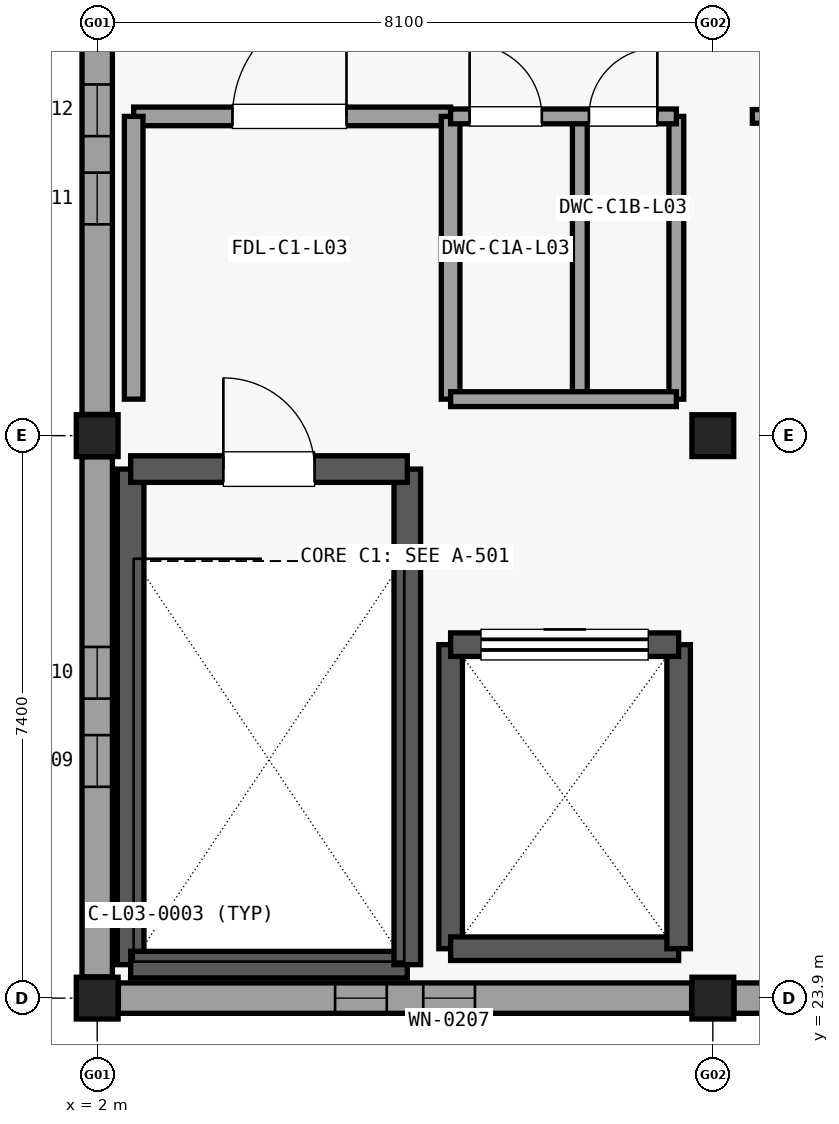
"""IFC4 building model, lengths in metres.
Left out: names, types, materials, properties, quantities, classifications, styles, units other than length and angle.
Written with IfcOpenShell. Run it as: python <this file> out.ifc"""

import sys

from ifc_helpers import new_model, si_unit, direction, frame, frame_2d, origin, origin_2d, place, context, subcontext, project, spatial, rectangle, extrude, element, fill, save


model = new_model("IFC4")
c1 = context("Model", 3, precision=1e-05, world=origin(), true_north=direction((0.0, 1.0)))
c2 = subcontext(c1, "Body", "Model", "MODEL_VIEW")
j1 = project(units=[si_unit("LENGTHUNIT", "METRE"), si_unit("PLANEANGLEUNIT", "RADIAN")], contexts=[c1])
p1 = place(None, origin())
s1 = spatial("IfcSite", under=j1, at=p1, CompositionType="ELEMENT")
p2 = place(p1, origin())
s2 = spatial("IfcBuilding", under=s1, at=p2, CompositionType="ELEMENT")
p3 = place(p2, frame((0.0, 0.0, 13.8)))
s3 = spatial("IfcBuildingStorey", under=s2, at=p3, CompositionType="ELEMENT", Elevation=13.8)
for number, where, z_axis, x_axis in (
    (1, (2.0, 23.9, 0.0), (0.0, 0.0, 1.0), (1.0, 0.0, 0.0)),
    (2, (2.0, 31.3, 0.0), (0.0, 0.0, 1.0), (1.0, 0.0, 0.0)),
    (3, (10.1, 23.9, 0.0), (0.0, 0.0, 1.0), (1.0, 0.0, 0.0)),
    (4, (10.1, 31.3, 0.0), (0.0, 0.0, 1.0), (1.0, 0.0, 0.0)),
):
    element("IfcColumn", number, at=place(p3, frame(where, z_axis=z_axis, x_axis=x_axis)), inside=s3, PredefinedType="COLUMN", context=c2, shape_type="SweptSolid", body=[
        extrude(rectangle(XDim=0.55, YDim=0.55, at=origin_2d()), origin(), (0.0, 0.0, 1.0), 3.38),
    ])
p4 = place(p3, frame((9.821, 23.9, 0.0), z_axis=(0.0, 0.0, 1.0), x_axis=(-1.0, 0.0, 0.0)))
e5 = element("IfcWall", 5, at=p4, inside=s3, PredefinedType="SOLIDWALL", context=c2, shape_type="SweptSolid", body=[
    extrude(rectangle(XDim=7.542, YDim=0.4, at=frame_2d((3.771, 0.0))), origin(), (0.0, 0.0, 1.0), 2.908),
])
p5 = place(p4, frame((2.851, 0.0, 0.6)))
e6 = element("IfcOpeningElement", 6, at=p5, cuts=e5, PredefinedType="OPENING", context=c2, shape_type="SweptSolid", body=[
    extrude(rectangle(XDim=0.68, YDim=1.78, at=frame_2d((0.34, 0.89))), frame((0.0, 0.21, 0.0), z_axis=(0.0, -1.0, 0.0), x_axis=(1.0, 0.0, 0.0)), (0.0, 0.0, 1.0), 0.42),
])
p6 = place(p4, frame((4.011, 0.0, 0.6)))
e7 = element("IfcOpeningElement", 7, at=p6, cuts=e5, PredefinedType="OPENING", context=c2, shape_type="SweptSolid", body=[
    extrude(rectangle(XDim=0.68, YDim=1.78, at=frame_2d((0.34, 0.89))), frame((0.0, 0.21, 0.0), z_axis=(0.0, -1.0, 0.0), x_axis=(1.0, 0.0, 0.0)), (0.0, 0.0, 1.0), 0.42),
])
p7 = place(p3, frame((2.0, 24.179, 0.0), z_axis=(0.0, 0.0, 1.0), x_axis=(0.0, 1.0, 0.0)))
e8 = element("IfcWall", 8, at=p7, inside=s3, PredefinedType="SOLIDWALL", context=c2, shape_type="SweptSolid", body=[
    extrude(rectangle(XDim=6.842, YDim=0.4, at=frame_2d((3.421, 0.0))), origin(), (0.0, 0.0, 1.0), 2.908),
])
p8 = place(p7, frame((2.501, 0.0, 0.6)))
e9 = element("IfcOpeningElement", 9, at=p8, cuts=e8, PredefinedType="OPENING", context=c2, shape_type="SweptSolid", body=[
    extrude(rectangle(XDim=0.68, YDim=1.78, at=frame_2d((0.34, 0.89))), frame((0.0, 0.21, 0.0), z_axis=(0.0, -1.0, 0.0), x_axis=(1.0, 0.0, 0.0)), (0.0, 0.0, 1.0), 0.42),
])
p9 = place(p7, frame((3.661, 0.0, 0.6)))
e10 = element("IfcOpeningElement", 10, at=p9, cuts=e8, PredefinedType="OPENING", context=c2, shape_type="SweptSolid", body=[
    extrude(rectangle(XDim=0.68, YDim=1.78, at=frame_2d((0.34, 0.89))), frame((0.0, 0.21, 0.0), z_axis=(0.0, -1.0, 0.0), x_axis=(1.0, 0.0, 0.0)), (0.0, 0.0, 1.0), 0.42),
])
p10 = place(p3, frame((2.0, 31.579, 0.0), z_axis=(0.0, 0.0, 1.0), x_axis=(0.0, 1.0, 0.0)))
e11 = element("IfcWall", 11, at=p10, inside=s3, PredefinedType="SOLIDWALL", context=c2, shape_type="SweptSolid", body=[
    extrude(rectangle(XDim=6.842, YDim=0.4, at=frame_2d((3.421, 0.0))), origin(), (0.0, 0.0, 1.0), 2.908),
])
p11 = place(p10, frame((2.501, 0.0, 0.6)))
e12 = element("IfcOpeningElement", 12, at=p11, cuts=e11, PredefinedType="OPENING", context=c2, shape_type="SweptSolid", body=[
    extrude(rectangle(XDim=0.68, YDim=1.78, at=frame_2d((0.34, 0.89))), frame((0.0, 0.21, 0.0), z_axis=(0.0, -1.0, 0.0), x_axis=(1.0, 0.0, 0.0)), (0.0, 0.0, 1.0), 0.42),
])
p12 = place(p10, frame((3.661, 0.0, 0.6)))
e13 = element("IfcOpeningElement", 13, at=p12, cuts=e11, PredefinedType="OPENING", context=c2, shape_type="SweptSolid", body=[
    extrude(rectangle(XDim=0.68, YDim=1.78, at=frame_2d((0.34, 0.89))), frame((0.0, 0.21, 0.0), z_axis=(0.0, -1.0, 0.0), x_axis=(1.0, 0.0, 0.0)), (0.0, 0.0, 1.0), 0.42),
])
p13 = place(p3, frame((17.921, 23.9, 0.0), z_axis=(0.0, 0.0, 1.0), x_axis=(-1.0, 0.0, 0.0)))
e14 = element("IfcWall", 14, at=p13, inside=s3, PredefinedType="SOLIDWALL", context=c2, shape_type="SweptSolid", body=[
    extrude(rectangle(XDim=7.542, YDim=0.4, at=frame_2d((3.771, 0.0))), origin(), (0.0, 0.0, 1.0), 2.908),
])
p14 = place(p13, frame((2.851, 0.0, 0.6)))
e15 = element("IfcOpeningElement", 15, at=p14, cuts=e14, PredefinedType="OPENING", context=c2, shape_type="SweptSolid", body=[
    extrude(rectangle(XDim=0.68, YDim=1.78, at=frame_2d((0.34, 0.89))), frame((0.0, 0.21, 0.0), z_axis=(0.0, -1.0, 0.0), x_axis=(1.0, 0.0, 0.0)), (0.0, 0.0, 1.0), 0.42),
])
p15 = place(p13, frame((4.011, 0.0, 0.6)))
e16 = element("IfcOpeningElement", 16, at=p15, cuts=e14, PredefinedType="OPENING", context=c2, shape_type="SweptSolid", body=[
    extrude(rectangle(XDim=0.68, YDim=1.78, at=frame_2d((0.34, 0.89))), frame((0.0, 0.21, 0.0), z_axis=(0.0, -1.0, 0.0), x_axis=(1.0, 0.0, 0.0)), (0.0, 0.0, 1.0), 0.42),
])
p16 = place(p3, frame((2.44, 24.34, 0.0), z_axis=(0.0, 0.0, 1.0), x_axis=(0.0, 1.0, 0.0)))
e17 = element("IfcWall", 17, at=p16, inside=s3, PredefinedType="SHEAR", context=c2, shape_type="SweptSolid", body=[
    extrude(rectangle(XDim=6.52, YDim=0.35, at=frame_2d((3.26, 0.0))), origin(), (0.0, 0.0, 1.0), 3.375),
])
p17 = place(p3, frame((2.44, 24.34, 0.0), z_axis=(0.0, 0.0, 1.0), x_axis=(1.0, 0.0, 0.0)))
e18 = element("IfcWall", 18, at=p17, inside=s3, PredefinedType="SHEAR", context=c2, shape_type="SweptSolid", body=[
    extrude(rectangle(XDim=3.64, YDim=0.35, at=frame_2d((1.82, 0.0))), origin(), (0.0, 0.0, 1.0), 3.375),
])
p18 = place(p3, frame((6.08, 24.34, 0.0), z_axis=(0.0, 0.0, 1.0), x_axis=(0.0, 1.0, 0.0)))
e19 = element("IfcWall", 19, at=p18, inside=s3, PredefinedType="SHEAR", context=c2, shape_type="SweptSolid", body=[
    extrude(rectangle(XDim=6.52, YDim=0.35, at=frame_2d((3.26, 0.0))), origin(), (0.0, 0.0, 1.0), 3.375),
])
p19 = place(p3, frame((2.44, 30.86, 0.0), z_axis=(0.0, 0.0, 1.0), x_axis=(1.0, 0.0, 0.0)))
e20 = element("IfcWall", 20, at=p19, inside=s3, PredefinedType="SHEAR", context=c2, shape_type="SweptSolid", body=[
    extrude(rectangle(XDim=3.64, YDim=0.35, at=frame_2d((1.82, 0.0))), origin(), (0.0, 0.0, 1.0), 3.375),
])
p20 = place(p19, frame((1.22, 0.0, 0.0)))
e21 = element("IfcOpeningElement", 21, at=p20, cuts=e20, PredefinedType="OPENING", context=c2, shape_type="SweptSolid", body=[
    extrude(rectangle(XDim=1.2, YDim=2.15, at=frame_2d((0.6, 1.075))), frame((0.0, 0.185, 0.0), z_axis=(0.0, -1.0, 0.0), x_axis=(1.0, 0.0, 0.0)), (0.0, 0.0, 1.0), 0.37),
])
p21 = place(p3, frame((6.65, 24.55, 0.0), z_axis=(0.0, 0.0, 1.0), x_axis=(0.0, 1.0, 0.0)))
e22 = element("IfcWall", 22, at=p21, inside=s3, PredefinedType="SHEAR", context=c2, shape_type="SweptSolid", body=[
    extrude(rectangle(XDim=4.0, YDim=0.31, at=frame_2d((2.0, 0.0))), origin(), (0.0, 0.0, 1.0), 3.375),
])
p22 = place(p3, frame((6.65, 24.55, 0.0), z_axis=(0.0, 0.0, 1.0), x_axis=(1.0, 0.0, 0.0)))
e23 = element("IfcWall", 23, at=p22, inside=s3, PredefinedType="SHEAR", context=c2, shape_type="SweptSolid", body=[
    extrude(rectangle(XDim=3.0, YDim=0.31, at=frame_2d((1.5, 0.0))), origin(), (0.0, 0.0, 1.0), 3.375),
])
p23 = place(p3, frame((9.65, 24.55, 0.0), z_axis=(0.0, 0.0, 1.0), x_axis=(0.0, 1.0, 0.0)))
e24 = element("IfcWall", 24, at=p23, inside=s3, PredefinedType="SHEAR", context=c2, shape_type="SweptSolid", body=[
    extrude(rectangle(XDim=4.0, YDim=0.31, at=frame_2d((2.0, 0.0))), origin(), (0.0, 0.0, 1.0), 3.375),
])
p24 = place(p3, frame((6.65, 28.55, 0.0), z_axis=(0.0, 0.0, 1.0), x_axis=(1.0, 0.0, 0.0)))
e25 = element("IfcWall", 25, at=p24, inside=s3, PredefinedType="SHEAR", context=c2, shape_type="SweptSolid", body=[
    extrude(rectangle(XDim=3.0, YDim=0.31, at=frame_2d((1.5, 0.0))), origin(), (0.0, 0.0, 1.0), 3.375),
])
p25 = place(p24, frame((0.4, 0.0, 0.0)))
e26 = element("IfcOpeningElement", 26, at=p25, cuts=e25, PredefinedType="OPENING", context=c2, shape_type="SweptSolid", body=[
    extrude(rectangle(XDim=2.2, YDim=2.55, at=frame_2d((1.1, 1.275))), frame((0.0, 0.165, 0.0), z_axis=(0.0, -1.0, 0.0), x_axis=(1.0, 0.0, 0.0)), (0.0, 0.0, 1.0), 0.33),
])
p26 = place(p3, frame((2.48, 35.5, 0.0), z_axis=(0.0, 0.0, 1.0), x_axis=(1.0, 0.0, 0.0)))
e27 = element("IfcWall", 27, at=p26, inside=s3, PredefinedType="PARTITIONING", context=c2, shape_type="SweptSolid", body=[
    extrude(rectangle(XDim=4.17, YDim=0.245, at=frame_2d((2.085, 0.0))), origin(), (0.0, 0.0, 1.0), 2.913),
])
p27 = place(p26, frame((1.3, 0.0, 0.0)))
e28 = element("IfcOpeningElement", 28, at=p27, cuts=e27, PredefinedType="OPENING", context=c2, shape_type="SweptSolid", body=[
    extrude(rectangle(XDim=1.5, YDim=2.15, at=frame_2d((0.75, 1.075))), frame((0.0, 0.133, 0.0), z_axis=(0.0, -1.0, 0.0), x_axis=(1.0, 0.0, 0.0)), (0.0, 0.0, 1.0), 0.265),
])
for number, where, z_axis, x_axis in (
    (29, (2.48, 31.78, 0.0), (0.0, 0.0, 1.0), (0.0, 1.0, 0.0)),
    (30, (6.65, 31.78, 0.0), (0.0, 0.0, 1.0), (0.0, 1.0, 0.0)),
):
    element("IfcWall", number, at=place(p3, frame(where, z_axis=z_axis, x_axis=x_axis)), inside=s3, PredefinedType="PARTITIONING", context=c2, shape_type="SweptSolid", body=[
        extrude(rectangle(XDim=3.72, YDim=0.245, at=frame_2d((1.86, 0.0))), origin(), (0.0, 0.0, 1.0), 2.913),
    ])
for number, where, z_axis, x_axis in (
    (31, (8.35, 31.78, 0.0), (0.0, 0.0, 1.0), (0.0, 1.0, 0.0)),
    (32, (9.62, 31.78, 0.0), (0.0, 0.0, 1.0), (0.0, 1.0, 0.0)),
):
    element("IfcWall", number, at=place(p3, frame(where, z_axis=z_axis, x_axis=x_axis)), inside=s3, PredefinedType="PARTITIONING", context=c2, shape_type="SweptSolid", body=[
        extrude(rectangle(XDim=3.72, YDim=0.195, at=frame_2d((1.86, 0.0))), origin(), (0.0, 0.0, 1.0), 2.913),
    ])
p28 = place(p3, frame((6.65, 31.78, 0.0), z_axis=(0.0, 0.0, 1.0), x_axis=(1.0, 0.0, 0.0)))
e33 = element("IfcWall", 33, at=p28, inside=s3, PredefinedType="PARTITIONING", context=c2, shape_type="SweptSolid", body=[
    extrude(rectangle(XDim=2.97, YDim=0.195, at=frame_2d((1.485, 0.0))), origin(), (0.0, 0.0, 1.0), 2.913),
])
p29 = place(p3, frame((6.65, 35.5, 0.0), z_axis=(0.0, 0.0, 1.0), x_axis=(1.0, 0.0, 0.0)))
e34 = element("IfcWall", 34, at=p29, inside=s3, PredefinedType="PARTITIONING", context=c2, shape_type="SweptSolid", body=[
    extrude(rectangle(XDim=2.97, YDim=0.195, at=frame_2d((1.485, 0.0))), origin(), (0.0, 0.0, 1.0), 2.913),
])
p30 = place(p29, frame((0.25, 0.0, 0.0)))
e35 = element("IfcOpeningElement", 35, at=p30, cuts=e34, PredefinedType="OPENING", context=c2, shape_type="SweptSolid", body=[
    extrude(rectangle(XDim=0.95, YDim=2.1, at=frame_2d((0.475, 1.05))), frame((0.0, 0.107, 0.0), z_axis=(0.0, -1.0, 0.0), x_axis=(1.0, 0.0, 0.0)), (0.0, 0.0, 1.0), 0.215),
])
p31 = place(p29, frame((1.82, 0.0, 0.0)))
e36 = element("IfcOpeningElement", 36, at=p31, cuts=e34, PredefinedType="OPENING", context=c2, shape_type="SweptSolid", body=[
    extrude(rectangle(XDim=0.9, YDim=2.1, at=frame_2d((0.45, 1.05))), frame((0.0, 0.107, 0.0), z_axis=(0.0, -1.0, 0.0), x_axis=(1.0, 0.0, 0.0)), (0.0, 0.0, 1.0), 0.215),
])
p32 = place(p3, frame((10.62, 35.5, 0.0), z_axis=(0.0, 0.0, 1.0), x_axis=(1.0, 0.0, 0.0)))
e37 = element("IfcWall", 37, at=p32, inside=s3, PredefinedType="PARTITIONING", context=c2, shape_type="SweptSolid", body=[
    extrude(rectangle(XDim=7.06, YDim=0.18, at=frame_2d((3.53, 0.0))), origin(), (0.0, 0.0, 1.0), 2.913),
])
p33 = place(p32, frame((2.88, 0.0, 0.0)))
e38 = element("IfcOpeningElement", 38, at=p33, cuts=e37, PredefinedType="OPENING", context=c2, shape_type="SweptSolid", body=[
    extrude(rectangle(XDim=1.3, YDim=2.2, at=frame_2d((0.65, 1.1))), frame((0.0, 0.1, 0.0), z_axis=(0.0, -1.0, 0.0), x_axis=(1.0, 0.0, 0.0)), (0.0, 0.0, 1.0), 0.2),
])
p34 = place(p5, origin())
e39 = element("IfcWindow", 39, at=p34, inside=s3, PartitioningType="SINGLE_PANEL", PredefinedType="WINDOW", context=c2, shape_type="SweptSolid", body=[
    extrude(rectangle(XDim=0.68, YDim=1.78, at=frame_2d((0.34, 0.89))), frame((0.0, 0.03, 0.0), z_axis=(0.0, -1.0, 0.0), x_axis=(1.0, 0.0, 0.0)), (0.0, 0.0, 1.0), 0.06),
])
fill(e6, e39)
p35 = place(p6, origin())
e40 = element("IfcWindow", 40, at=p35, inside=s3, PartitioningType="SINGLE_PANEL", PredefinedType="WINDOW", context=c2, shape_type="SweptSolid", body=[
    extrude(rectangle(XDim=0.68, YDim=1.78, at=frame_2d((0.34, 0.89))), frame((0.0, 0.03, 0.0), z_axis=(0.0, -1.0, 0.0), x_axis=(1.0, 0.0, 0.0)), (0.0, 0.0, 1.0), 0.06),
])
fill(e7, e40)
p36 = place(p8, origin())
e41 = element("IfcWindow", 41, at=p36, inside=s3, PartitioningType="SINGLE_PANEL", PredefinedType="WINDOW", context=c2, shape_type="SweptSolid", body=[
    extrude(rectangle(XDim=0.68, YDim=1.78, at=frame_2d((0.34, 0.89))), frame((0.0, 0.03, 0.0), z_axis=(0.0, -1.0, 0.0), x_axis=(1.0, 0.0, 0.0)), (0.0, 0.0, 1.0), 0.06),
])
fill(e9, e41)
p37 = place(p9, origin())
e42 = element("IfcWindow", 42, at=p37, inside=s3, PartitioningType="SINGLE_PANEL", PredefinedType="WINDOW", context=c2, shape_type="SweptSolid", body=[
    extrude(rectangle(XDim=0.68, YDim=1.78, at=frame_2d((0.34, 0.89))), frame((0.0, 0.03, 0.0), z_axis=(0.0, -1.0, 0.0), x_axis=(1.0, 0.0, 0.0)), (0.0, 0.0, 1.0), 0.06),
])
fill(e10, e42)
p38 = place(p11, origin())
e43 = element("IfcWindow", 43, at=p38, inside=s3, PartitioningType="SINGLE_PANEL", PredefinedType="WINDOW", context=c2, shape_type="SweptSolid", body=[
    extrude(rectangle(XDim=0.68, YDim=1.78, at=frame_2d((0.34, 0.89))), frame((0.0, 0.03, 0.0), z_axis=(0.0, -1.0, 0.0), x_axis=(1.0, 0.0, 0.0)), (0.0, 0.0, 1.0), 0.06),
])
fill(e12, e43)
p39 = place(p12, origin())
e44 = element("IfcWindow", 44, at=p39, inside=s3, PartitioningType="SINGLE_PANEL", PredefinedType="WINDOW", context=c2, shape_type="SweptSolid", body=[
    extrude(rectangle(XDim=0.68, YDim=1.78, at=frame_2d((0.34, 0.89))), frame((0.0, 0.03, 0.0), z_axis=(0.0, -1.0, 0.0), x_axis=(1.0, 0.0, 0.0)), (0.0, 0.0, 1.0), 0.06),
])
fill(e13, e44)
p40 = place(p20, origin())
e45 = element("IfcDoor", 45, at=p40, inside=s3, OperationType="SINGLE_SWING_LEFT", PredefinedType="DOOR", context=c2, shape_type="SweptSolid", body=[
    extrude(rectangle(XDim=1.2, YDim=2.15, at=frame_2d((0.6, 1.075))), frame((0.0, 0.025, 0.0), z_axis=(0.0, -1.0, 0.0), x_axis=(1.0, 0.0, 0.0)), (0.0, 0.0, 1.0), 0.05),
])
fill(e21, e45)
p41 = place(p25, origin())
e46 = element("IfcDoor", 46, at=p41, inside=s3, OperationType="SLIDING_TO_LEFT", PredefinedType="DOOR", context=c2, shape_type="SweptSolid", body=[
    extrude(rectangle(XDim=2.2, YDim=2.55, at=frame_2d((1.1, 1.275))), frame((0.0, 0.025, 0.0), z_axis=(0.0, -1.0, 0.0), x_axis=(1.0, 0.0, 0.0)), (0.0, 0.0, 1.0), 0.05),
])
fill(e26, e46)
p42 = place(p27, origin())
e47 = element("IfcDoor", 47, at=p42, inside=s3, OperationType="SINGLE_SWING_RIGHT", PredefinedType="DOOR", context=c2, shape_type="SweptSolid", body=[
    extrude(rectangle(XDim=1.5, YDim=2.15, at=frame_2d((0.75, 1.075))), frame((0.0, 0.025, 0.0), z_axis=(0.0, -1.0, 0.0), x_axis=(1.0, 0.0, 0.0)), (0.0, 0.0, 1.0), 0.05),
])
fill(e28, e47)
p43 = place(p30, origin())
e48 = element("IfcDoor", 48, at=p43, inside=s3, OperationType="SINGLE_SWING_LEFT", PredefinedType="DOOR", context=c2, shape_type="SweptSolid", body=[
    extrude(rectangle(XDim=0.95, YDim=2.1, at=frame_2d((0.475, 1.05))), frame((0.0, 0.025, 0.0), z_axis=(0.0, -1.0, 0.0), x_axis=(1.0, 0.0, 0.0)), (0.0, 0.0, 1.0), 0.05),
])
fill(e35, e48)
p44 = place(p31, origin())
e49 = element("IfcDoor", 49, at=p44, inside=s3, OperationType="SINGLE_SWING_RIGHT", PredefinedType="DOOR", context=c2, shape_type="SweptSolid", body=[
    extrude(rectangle(XDim=0.9, YDim=2.1, at=frame_2d((0.45, 1.05))), frame((0.0, 0.025, 0.0), z_axis=(0.0, -1.0, 0.0), x_axis=(1.0, 0.0, 0.0)), (0.0, 0.0, 1.0), 0.05),
])
fill(e36, e49)
save(model, sys.argv[1])
